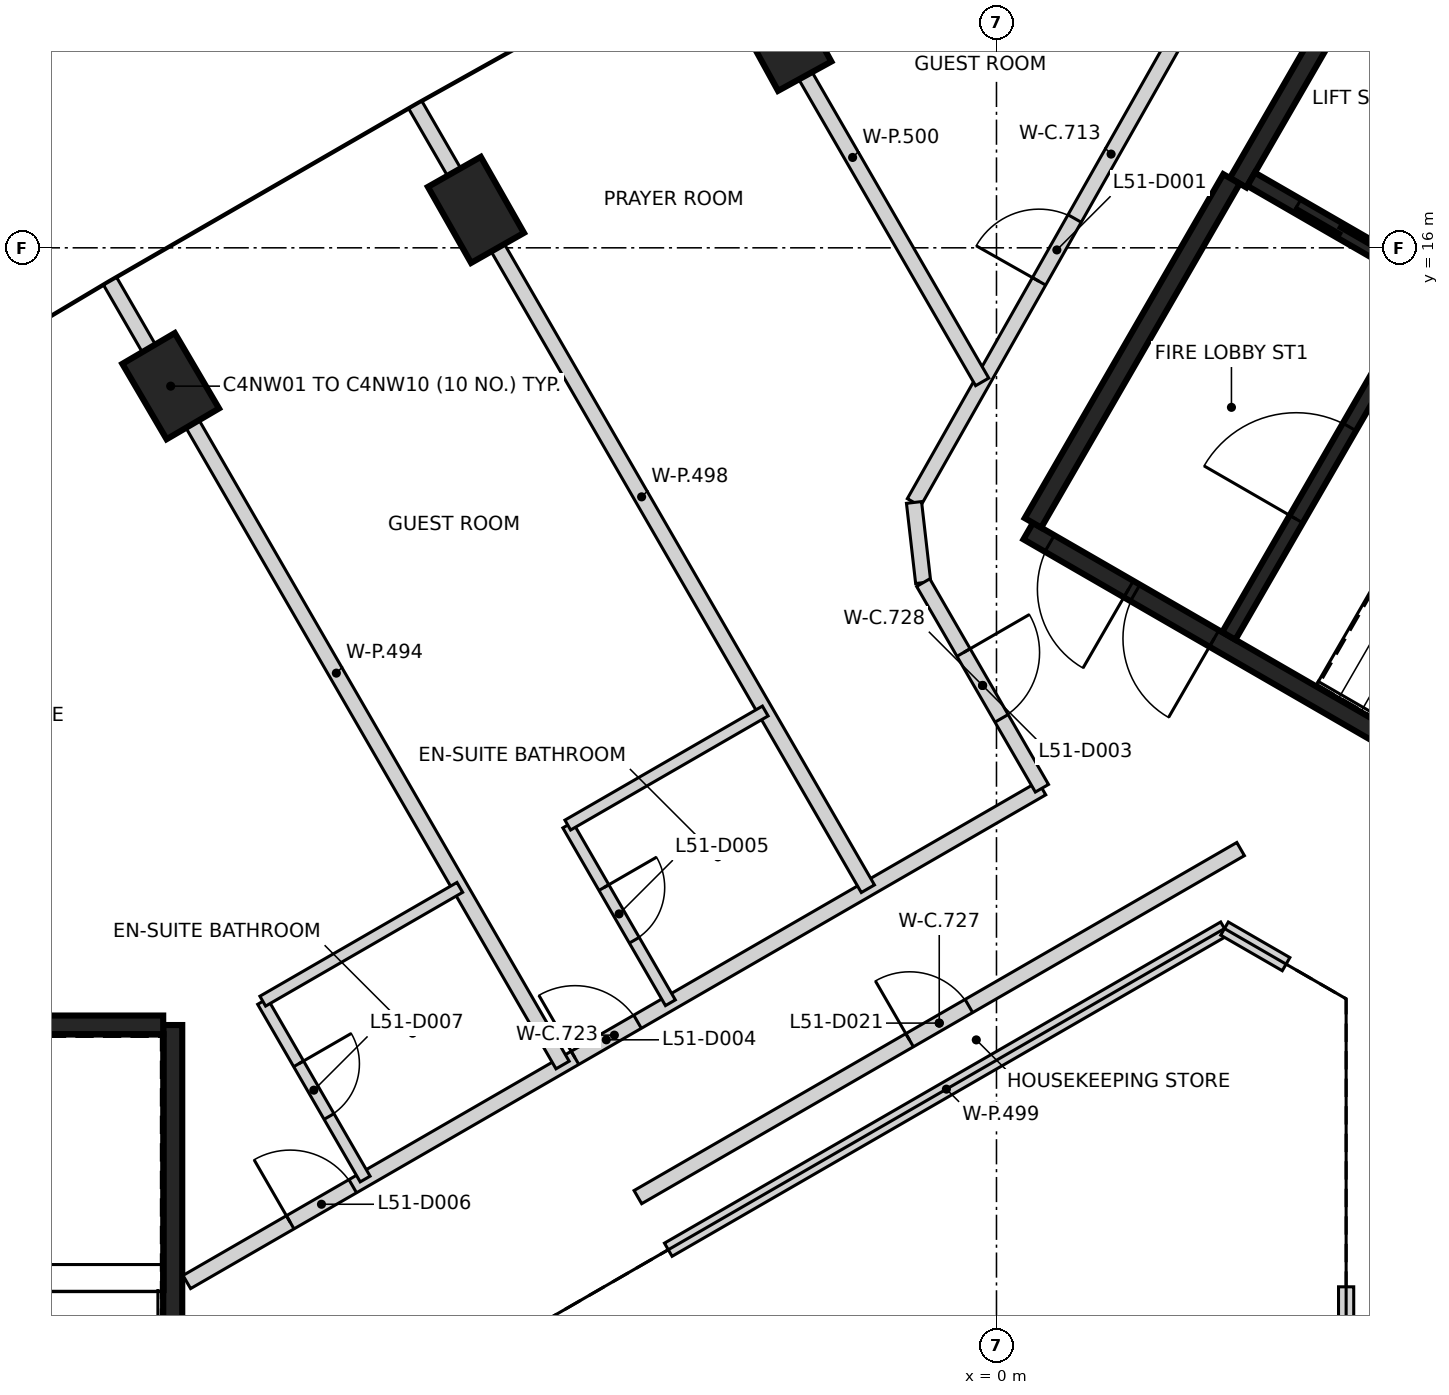
"""IFC4 building model, lengths in metres.
Left out: names, types, materials, properties, quantities, classifications, styles, units other than length and angle.
Written with IfcOpenShell. Run it as: python <this file> out.ifc"""

import sys

from ifc_helpers import new_model, si_unit, direction, frame, frame_2d, origin, origin_2d, place, context, subcontext, project, spatial, rectangle, extrude, element, fill, save


model = new_model("IFC4")
c1 = context("Model", 3, precision=1e-05, world=origin(), true_north=direction((0.0, 1.0)))
c2 = subcontext(c1, "Body", "Model", "MODEL_VIEW")
j1 = project(units=[si_unit("LENGTHUNIT", "METRE"), si_unit("PLANEANGLEUNIT", "RADIAN")], contexts=[c1])
p1 = place(None, origin())
s1 = spatial("IfcSite", under=j1, at=p1, CompositionType="ELEMENT")
p2 = place(p1, origin())
s2 = spatial("IfcBuilding", under=s1, at=p2, CompositionType="ELEMENT")
p3 = place(p2, frame((0.0, 0.0, 204.4)))
s3 = spatial("IfcBuildingStorey", under=s2, at=p3, CompositionType="ELEMENT", Elevation=204.4)
for number, where, z_axis, x_axis in (
    (1, (-2.8, 18.762, -0.35), (0.0, 0.0, 1.0), (-0.482, 0.876, 0.0)),
    (2, (-6.848, 16.499, -0.35), (0.0, 0.0, 1.0), (-0.494, 0.87, 0.0)),
    (3, (-10.864, 14.18, -0.35), (0.0, 0.0, 1.0), (-0.506, 0.862, 0.0)),
):
    element("IfcColumn", number, at=place(p3, frame(where, z_axis=z_axis, x_axis=x_axis)), inside=s3, PredefinedType="COLUMN", context=c2, shape_type="SweptSolid", body=[
        extrude(rectangle(XDim=1.15, YDim=0.8, at=origin_2d()), origin(), (0.0, 0.0, 1.0), 3.6),
    ])
p4 = place(p3, frame((-10.837, 5.775, 0.0), z_axis=(0.0, 0.0, 1.0), x_axis=(0.0, -1.0, 0.0)))
e4 = element("IfcWall", 4, at=p4, inside=s3, PredefinedType="SHEAR", context=c2, shape_type="SweptSolid", body=[
    extrude(rectangle(XDim=11.55, YDim=0.25, at=frame_2d((5.775, 0.0))), origin(), (0.0, 0.0, 1.0), 3.25),
])
p5 = place(p4, frame((10.025, 0.0, 0.0)))
e5 = element("IfcOpeningElement", 5, at=p5, cuts=e4, PredefinedType="OPENING", context=c2, shape_type="SweptSolid", body=[
    extrude(rectangle(XDim=1.2, YDim=2.1, at=frame_2d((0.6, 1.05))), frame((0.0, 0.135, 0.0), z_axis=(0.0, -1.0, 0.0), x_axis=(1.0, 0.0, 0.0)), (0.0, 0.0, 1.0), 0.27),
])
p6 = place(p4, frame((8.725, 0.0, 0.0)))
e6 = element("IfcOpeningElement", 6, at=p6, cuts=e4, PredefinedType="OPENING", context=c2, shape_type="SweptSolid", body=[
    extrude(rectangle(XDim=1.2, YDim=2.1, at=frame_2d((0.6, 1.05))), frame((0.0, 0.135, 0.0), z_axis=(0.0, -1.0, 0.0), x_axis=(1.0, 0.0, 0.0)), (0.0, 0.0, 1.0), 0.27),
])
p7 = place(p3, frame((-16.472, 5.775, 0.0), z_axis=(0.0, 0.0, 1.0), x_axis=(1.0, 0.0, 0.0)))
e7 = element("IfcWall", 7, at=p7, inside=s3, PredefinedType="SHEAR", context=c2, shape_type="SweptSolid", body=[
    extrude(rectangle(XDim=5.51, YDim=0.25, at=frame_2d((2.755, 0.0))), origin(), (0.0, 0.0, 1.0), 3.25),
])
p8 = place(p3, frame((10.42, 6.498, 0.0), z_axis=(0.0, 0.0, 1.0), x_axis=(-0.866021906294, 0.500006057782, 0.0)))
e8 = element("IfcWall", 8, at=p8, inside=s3, PredefinedType="SHEAR", context=c2, shape_type="SweptSolid", body=[
    extrude(rectangle(XDim=11.55, YDim=0.25, at=frame_2d((5.775, 0.0))), origin(), (0.0, 0.0, 1.0), 3.25),
])
p9 = place(p8, frame((10.025, 0.0, 0.0)))
e9 = element("IfcOpeningElement", 9, at=p9, cuts=e8, PredefinedType="OPENING", context=c2, shape_type="SweptSolid", body=[
    extrude(rectangle(XDim=1.2, YDim=2.1, at=frame_2d((0.6, 1.05))), frame((0.0, 0.135, 0.0), z_axis=(0.0, -1.0, 0.0), x_axis=(1.0, 0.0, 0.0)), (0.0, 0.0, 1.0), 0.27),
])
p10 = place(p8, frame((8.725, 0.0, 0.0)))
e10 = element("IfcOpeningElement", 10, at=p10, cuts=e8, PredefinedType="OPENING", context=c2, shape_type="SweptSolid", body=[
    extrude(rectangle(XDim=1.2, YDim=2.1, at=frame_2d((0.6, 1.05))), frame((0.0, 0.135, 0.0), z_axis=(0.0, -1.0, 0.0), x_axis=(1.0, 0.0, 0.0)), (0.0, 0.0, 1.0), 0.27),
])
p11 = place(p3, frame((3.179, 16.856, 0.0), z_axis=(0.0, 0.0, 1.0), x_axis=(0.500001955336, 0.866024274868, 0.0)))
e11 = element("IfcWall", 11, at=p11, inside=s3, PredefinedType="SHEAR", context=c2, shape_type="SweptSolid", body=[
    extrude(rectangle(XDim=6.125, YDim=0.25, at=frame_2d((3.062, 0.0))), origin(), (0.0, 0.0, 1.0), 3.25),
])
p12 = place(p11, frame((3.563, 0.0, 0.0)))
e12 = element("IfcOpeningElement", 12, at=p12, cuts=e11, PredefinedType="OPENING", context=c2, shape_type="SweptSolid", body=[
    extrude(rectangle(XDim=1.0, YDim=2.1, at=frame_2d((0.5, 1.05))), frame((0.0, 0.135, 0.0), z_axis=(0.0, -1.0, 0.0), x_axis=(1.0, 0.0, 0.0)), (0.0, 0.0, 1.0), 0.27),
])
p13 = place(p3, frame((0.48, 12.381, 0.0), z_axis=(0.0, 0.0, 1.0), x_axis=(0.49999885962, 0.866026062182, 0.0)))
e13 = element("IfcWall", 13, at=p13, inside=s3, PredefinedType="SHEAR", context=c2, shape_type="SweptSolid", body=[
    extrude(rectangle(XDim=5.225, YDim=0.25, at=frame_2d((2.612, 0.0))), origin(), (0.0, 0.0, 1.0), 3.25),
])
p14 = place(p3, frame((3.057, 10.895, 0.0), z_axis=(0.0, 0.0, 1.0), x_axis=(0.500027839223, 0.866009330205, 0.0)))
e14 = element("IfcWall", 14, at=p14, inside=s3, PredefinedType="SHEAR", context=c2, shape_type="SweptSolid", body=[
    extrude(rectangle(XDim=5.098, YDim=0.2, at=frame_2d((2.549, 0.0))), origin(), (0.0, 0.0, 1.0), 3.25),
])
p15 = place(p14, frame((1.774, 0.0, 0.0)))
e15 = element("IfcOpeningElement", 15, at=p15, cuts=e14, PredefinedType="OPENING", context=c2, shape_type="SweptSolid", body=[
    extrude(rectangle(XDim=1.4, YDim=2.1, at=frame_2d((0.7, 1.05))), frame((0.0, 0.11, 0.0), z_axis=(0.0, -1.0, 0.0), x_axis=(1.0, 0.0, 0.0)), (0.0, 0.0, 1.0), 0.22),
])
p16 = place(p3, frame((5.646, 15.576, 0.0), z_axis=(0.0, 0.0, 1.0), x_axis=(-0.866018407898, 0.500012117035, 0.0)))
e16 = element("IfcWall", 16, at=p16, inside=s3, PredefinedType="SHEAR", context=c2, shape_type="SweptSolid", body=[
    extrude(rectangle(XDim=2.651, YDim=0.2, at=frame_2d((1.325, 0.0))), origin(), (0.0, 0.0, 1.0), 3.25),
])
p17 = place(p16, frame((0.652, 0.0, 0.0)))
e17 = element("IfcOpeningElement", 17, at=p17, cuts=e16, PredefinedType="OPENING", context=c2, shape_type="SweptSolid", body=[
    extrude(rectangle(XDim=1.3, YDim=2.1, at=frame_2d((0.65, 1.05))), frame((0.0, 0.11, 0.0), z_axis=(0.0, -1.0, 0.0), x_axis=(1.0, 0.0, 0.0)), (0.0, 0.0, 1.0), 0.22),
])
p18 = place(p3, frame((7.196, 18.26, 0.0), z_axis=(0.0, 0.0, 1.0), x_axis=(-0.866018407898, 0.500012117035, 0.0)))
e18 = element("IfcWall", 18, at=p18, inside=s3, PredefinedType="SHEAR", context=c2, shape_type="SweptSolid", body=[
    extrude(rectangle(XDim=2.651, YDim=0.2, at=frame_2d((1.325, 0.0))), origin(), (0.0, 0.0, 1.0), 3.25),
])
p19 = place(p3, frame((-10.652, 2.394, 0.0), z_axis=(0.0, 0.0, 1.0), x_axis=(0.866016271077, 0.500015817979, 0.0)))
e19 = element("IfcWall", 19, at=p19, inside=s3, PredefinedType="PARTITIONING", context=c2, shape_type="SweptSolid", body=[
    extrude(rectangle(XDim=12.991, YDim=0.2, at=frame_2d((6.495, 0.0))), origin(), (0.0, 0.0, 1.0), 3.25),
])
p20 = place(p19, frame((5.898, 0.0, 0.0)))
e20 = element("IfcOpeningElement", 20, at=p20, cuts=e19, PredefinedType="OPENING", context=c2, shape_type="SweptSolid", body=[
    extrude(rectangle(XDim=0.95, YDim=2.1, at=frame_2d((0.475, 1.05))), frame((0.0, 0.11, 0.0), z_axis=(0.0, -1.0, 0.0), x_axis=(1.0, 0.0, 0.0)), (0.0, 0.0, 1.0), 0.22),
])
p21 = place(p19, frame((1.571, 0.0, 0.0)))
e21 = element("IfcOpeningElement", 21, at=p21, cuts=e19, PredefinedType="OPENING", context=c2, shape_type="SweptSolid", body=[
    extrude(rectangle(XDim=0.95, YDim=2.1, at=frame_2d((0.475, 1.05))), frame((0.0, 0.11, 0.0), z_axis=(0.0, -1.0, 0.0), x_axis=(1.0, 0.0, 0.0)), (0.0, 0.0, 1.0), 0.22),
])
p22 = place(p3, frame((-4.718, 3.511, 0.0), z_axis=(0.0, 0.0, 1.0), x_axis=(0.865989775611, 0.500061704731, 0.0)))
e22 = element("IfcWall", 22, at=p22, inside=s3, PredefinedType="PARTITIONING", context=c2, shape_type="SweptSolid", body=[
    extrude(rectangle(XDim=9.157, YDim=0.2, at=frame_2d((4.579, 0.0))), origin(), (0.0, 0.0, 1.0), 3.25),
])
p23 = place(p22, frame((4.128, 0.0, 0.0)))
e23 = element("IfcOpeningElement", 23, at=p23, cuts=e22, PredefinedType="OPENING", context=c2, shape_type="SweptSolid", body=[
    extrude(rectangle(XDim=0.9, YDim=2.1, at=frame_2d((0.45, 1.05))), frame((0.0, 0.11, 0.0), z_axis=(0.0, -1.0, 0.0), x_axis=(1.0, 0.0, 0.0)), (0.0, 0.0, 1.0), 0.22),
])
p24 = place(p3, frame((-1.086, 12.65, 0.0), z_axis=(0.0, 0.0, 1.0), x_axis=(0.492552173528, 0.87028291742, 0.0)))
e24 = element("IfcWall", 24, at=p24, inside=s3, PredefinedType="PARTITIONING", context=c2, shape_type="SweptSolid", body=[
    extrude(rectangle(XDim=10.531, YDim=0.2, at=frame_2d((5.266, 0.0))), origin(), (0.0, 0.0, 1.0), 3.25),
])
p25 = place(p24, frame((3.342, 0.0, 0.0)))
e25 = element("IfcOpeningElement", 25, at=p25, cuts=e24, PredefinedType="OPENING", context=c2, shape_type="SweptSolid", body=[
    extrude(rectangle(XDim=0.95, YDim=2.1, at=frame_2d((0.475, 1.05))), frame((0.0, 0.11, 0.0), z_axis=(0.0, -1.0, 0.0), x_axis=(1.0, 0.0, 0.0)), (0.0, 0.0, 1.0), 0.22),
])
p26 = place(p3, frame((-1.085, 12.65, 0.0), z_axis=(0.0, 0.0, 1.0), x_axis=(0.113812454263, -0.993502252264, 0.0)))
e26 = element("IfcWall", 26, at=p26, inside=s3, PredefinedType="PARTITIONING", context=c2, shape_type="SweptSolid", body=[
    extrude(rectangle(XDim=1.062, YDim=0.2, at=frame_2d((0.531, 0.0))), origin(), (0.0, 0.0, 1.0), 3.25),
])
p27 = place(p3, frame((-0.964, 11.595, 0.0), z_axis=(0.0, 0.0, 1.0), x_axis=(0.500056215256, -0.865992945458, 0.0)))
e27 = element("IfcWall", 27, at=p27, inside=s3, PredefinedType="PARTITIONING", context=c2, shape_type="SweptSolid", body=[
    extrude(rectangle(XDim=3.124, YDim=0.2, at=frame_2d((1.562, 0.0))), origin(), (0.0, 0.0, 1.0), 3.25),
])
p28 = place(p27, frame((1.062, 0.0, 0.0)))
e28 = element("IfcOpeningElement", 28, at=p28, cuts=e27, PredefinedType="OPENING", context=c2, shape_type="SweptSolid", body=[
    extrude(rectangle(XDim=1.0, YDim=2.1, at=frame_2d((0.5, 1.05))), frame((0.0, 0.11, 0.0), z_axis=(0.0, -1.0, 0.0), x_axis=(1.0, 0.0, 0.0)), (0.0, 0.0, 1.0), 0.22),
])
p29 = place(p3, frame((-11.661, 15.561, 0.0), z_axis=(0.0, 0.0, 1.0), x_axis=(0.499960887391, -0.866047984282, 0.0)))
e29 = element("IfcWall", 29, at=p29, inside=s3, PredefinedType="PARTITIONING", context=c2, shape_type="SweptSolid", body=[
    extrude(rectangle(XDim=11.907, YDim=0.2, at=frame_2d((5.953, 0.0))), origin(), (0.0, 0.0, 1.0), 3.25),
])
p30 = place(p3, frame((-7.646, 17.879, 0.0), z_axis=(0.0, 0.0, 1.0), x_axis=(0.500042538917, -0.866000842536, 0.0)))
e30 = element("IfcWall", 30, at=p30, inside=s3, PredefinedType="PARTITIONING", context=c2, shape_type="SweptSolid", body=[
    extrude(rectangle(XDim=11.906, YDim=0.2, at=frame_2d((5.953, 0.0))), origin(), (0.0, 0.0, 1.0), 3.25),
])
p31 = place(p3, frame((-4.318, 2.819, 0.0), z_axis=(0.0, 0.0, 1.0), x_axis=(0.866038843867, 0.499976720371, 0.0)))
e31 = element("IfcWall", 31, at=p31, inside=s3, PredefinedType="PARTITIONING", context=c2, shape_type="SweptSolid", body=[
    extrude(rectangle(XDim=8.45, YDim=0.2, at=frame_2d((4.225, 0.0))), origin(), (0.0, 0.0, 1.0), 3.25),
])
p32 = place(p3, frame((-3.598, 20.142, 0.0), z_axis=(0.0, 0.0, 1.0), x_axis=(0.499981732209, -0.866035950442, 0.0)))
e32 = element("IfcWall", 32, at=p32, inside=s3, PredefinedType="PARTITIONING", context=c2, shape_type="SweptSolid", body=[
    extrude(rectangle(XDim=6.82, YDim=0.2, at=frame_2d((3.41, 0.0))), origin(), (0.0, 0.0, 1.0), 3.25),
])
p33 = place(p3, frame((3.0, 7.044, 0.0), z_axis=(0.0, 0.0, 1.0), x_axis=(0.865872609263, -0.500264554538, 0.0)))
e33 = element("IfcWall", 33, at=p33, inside=s3, PredefinedType="PARTITIONING", context=c2, shape_type="SweptSolid", body=[
    extrude(rectangle(XDim=0.936, YDim=0.2, at=frame_2d((0.468, 0.0))), origin(), (0.0, 0.0, 1.0), 3.25),
])
p34 = place(p3, frame((4.6, -6.12, 0.0), z_axis=(0.0, 0.0, 1.0), x_axis=(0.0, 1.0, 0.0)))
e34 = element("IfcWall", 34, at=p34, inside=s3, PredefinedType="PARTITIONING", context=c2, shape_type="SweptSolid", body=[
    extrude(rectangle(XDim=8.451, YDim=0.2, at=frame_2d((4.226, 0.0))), origin(), (0.0, 0.0, 1.0), 3.25),
])
p35 = place(p3, frame((-9.655, 6.085, 0.0), z_axis=(0.0, 0.0, 1.0), x_axis=(0.500129820725, -0.865950438779, 0.0)))
e35 = element("IfcWall", 35, at=p35, inside=s3, PredefinedType="PARTITIONING", context=c2, shape_type="SweptSolid", body=[
    extrude(rectangle(XDim=2.698, YDim=0.15, at=frame_2d((1.349, 0.0))), origin(), (0.0, 0.0, 1.0), 3.25),
])
p36 = place(p35, frame((0.948, 0.0, 0.0)))
e36 = element("IfcOpeningElement", 36, at=p36, cuts=e35, PredefinedType="OPENING", context=c2, shape_type="SweptSolid", body=[
    extrude(rectangle(XDim=0.8, YDim=2.1, at=frame_2d((0.4, 1.05))), frame((0.0, 0.085, 0.0), z_axis=(0.0, -1.0, 0.0), x_axis=(1.0, 0.0, 0.0)), (0.0, 0.0, 1.0), 0.17),
])
p37 = place(p3, frame((-9.653, 6.089, 0.0), z_axis=(0.0, 0.0, 1.0), x_axis=(0.866021254674, 0.500007186402, 0.0)))
e37 = element("IfcWall", 37, at=p37, inside=s3, PredefinedType="PARTITIONING", context=c2, shape_type="SweptSolid", body=[
    extrude(rectangle(XDim=2.994, YDim=0.15, at=frame_2d((1.497, 0.0))), origin(), (0.0, 0.0, 1.0), 3.25),
])
p38 = place(p3, frame((-5.64, 8.406, 0.0), z_axis=(0.0, 0.0, 1.0), x_axis=(0.50001992892, -0.866013897511, 0.0)))
e38 = element("IfcWall", 38, at=p38, inside=s3, PredefinedType="PARTITIONING", context=c2, shape_type="SweptSolid", body=[
    extrude(rectangle(XDim=2.7, YDim=0.15, at=frame_2d((1.35, 0.0))), origin(), (0.0, 0.0, 1.0), 3.25),
])
p39 = place(p38, frame((0.95, 0.0, 0.0)))
e39 = element("IfcOpeningElement", 39, at=p39, cuts=e38, PredefinedType="OPENING", context=c2, shape_type="SweptSolid", body=[
    extrude(rectangle(XDim=0.8, YDim=2.1, at=frame_2d((0.4, 1.05))), frame((0.0, 0.085, 0.0), z_axis=(0.0, -1.0, 0.0), x_axis=(1.0, 0.0, 0.0)), (0.0, 0.0, 1.0), 0.17),
])
p40 = place(p3, frame((-5.64, 8.406, 0.0), z_axis=(0.0, 0.0, 1.0), x_axis=(0.866010750942, 0.50002537861, 0.0)))
e40 = element("IfcWall", 40, at=p40, inside=s3, PredefinedType="PARTITIONING", context=c2, shape_type="SweptSolid", body=[
    extrude(rectangle(XDim=3.0, YDim=0.15, at=frame_2d((1.5, 0.0))), origin(), (0.0, 0.0, 1.0), 3.25),
])
p41 = place(p17, origin())
e41 = element("IfcDoor", 41, at=p41, inside=s3, OperationType="SLIDING_TO_LEFT", PredefinedType="DOOR", context=c2, shape_type="SweptSolid", body=[
    extrude(rectangle(XDim=1.3, YDim=2.1, at=frame_2d((0.65, 1.05))), frame((0.0, 0.025, 0.0), z_axis=(0.0, -1.0, 0.0), x_axis=(1.0, 0.0, 0.0)), (0.0, 0.0, 1.0), 0.05),
])
fill(e17, e41)
p42 = place(p9, origin())
e42 = element("IfcDoor", 42, at=p42, inside=s3, OperationType="SINGLE_SWING_LEFT", PredefinedType="DOOR", context=c2, shape_type="SweptSolid", body=[
    extrude(rectangle(XDim=1.2, YDim=2.1, at=frame_2d((0.6, 1.05))), frame((0.0, 0.025, 0.0), z_axis=(0.0, -1.0, 0.0), x_axis=(1.0, 0.0, 0.0)), (0.0, 0.0, 1.0), 0.05),
])
fill(e9, e42)
p43 = place(p10, origin())
e43 = element("IfcDoor", 43, at=p43, inside=s3, OperationType="SINGLE_SWING_RIGHT", PredefinedType="DOOR", context=c2, shape_type="SweptSolid", body=[
    extrude(rectangle(XDim=1.2, YDim=2.1, at=frame_2d((0.6, 1.05))), frame((0.0, 0.025, 0.0), z_axis=(0.0, -1.0, 0.0), x_axis=(1.0, 0.0, 0.0)), (0.0, 0.0, 1.0), 0.05),
])
fill(e10, e43)
p44 = place(p15, origin())
e44 = element("IfcDoor", 44, at=p44, inside=s3, OperationType="SINGLE_SWING_LEFT", PredefinedType="DOOR", context=c2, shape_type="SweptSolid", body=[
    extrude(rectangle(XDim=1.4, YDim=2.1, at=frame_2d((0.7, 1.05))), frame((0.0, 0.025, 0.0), z_axis=(0.0, -1.0, 0.0), x_axis=(1.0, 0.0, 0.0)), (0.0, 0.0, 1.0), 0.05),
])
fill(e15, e44)
p45 = place(p25, origin())
e45 = element("IfcDoor", 45, at=p45, inside=s3, OperationType="SINGLE_SWING_LEFT", PredefinedType="DOOR", context=c2, shape_type="SweptSolid", body=[
    extrude(rectangle(XDim=0.95, YDim=2.1, at=frame_2d((0.475, 1.05))), frame((0.0, 0.025, 0.0), z_axis=(0.0, -1.0, 0.0), x_axis=(1.0, 0.0, 0.0)), (0.0, 0.0, 1.0), 0.05),
])
fill(e25, e45)
p46 = place(p28, frame((1.0, 0.0, 0.0), z_axis=(0.0, 0.0, 1.0), x_axis=(-1.0, 0.0, 0.0)))
e46 = element("IfcDoor", 46, at=p46, inside=s3, OperationType="SINGLE_SWING_LEFT", PredefinedType="DOOR", context=c2, shape_type="SweptSolid", body=[
    extrude(rectangle(XDim=1.0, YDim=2.1, at=frame_2d((0.5, 1.05))), frame((0.0, 0.025, 0.0), z_axis=(0.0, -1.0, 0.0), x_axis=(1.0, 0.0, 0.0)), (0.0, 0.0, 1.0), 0.05),
])
fill(e28, e46)
p47 = place(p20, origin())
e47 = element("IfcDoor", 47, at=p47, inside=s3, OperationType="SINGLE_SWING_LEFT", PredefinedType="DOOR", context=c2, shape_type="SweptSolid", body=[
    extrude(rectangle(XDim=0.95, YDim=2.1, at=frame_2d((0.475, 1.05))), frame((0.0, 0.025, 0.0), z_axis=(0.0, -1.0, 0.0), x_axis=(1.0, 0.0, 0.0)), (0.0, 0.0, 1.0), 0.05),
])
fill(e20, e47)
p48 = place(p39, origin())
e48 = element("IfcDoor", 48, at=p48, inside=s3, OperationType="SINGLE_SWING_LEFT", PredefinedType="DOOR", context=c2, shape_type="SweptSolid", body=[
    extrude(rectangle(XDim=0.8, YDim=2.1, at=frame_2d((0.4, 1.05))), frame((0.0, 0.025, 0.0), z_axis=(0.0, -1.0, 0.0), x_axis=(1.0, 0.0, 0.0)), (0.0, 0.0, 1.0), 0.05),
])
fill(e39, e48)
p49 = place(p21, origin())
e49 = element("IfcDoor", 49, at=p49, inside=s3, OperationType="SINGLE_SWING_LEFT", PredefinedType="DOOR", context=c2, shape_type="SweptSolid", body=[
    extrude(rectangle(XDim=0.95, YDim=2.1, at=frame_2d((0.475, 1.05))), frame((0.0, 0.025, 0.0), z_axis=(0.0, -1.0, 0.0), x_axis=(1.0, 0.0, 0.0)), (0.0, 0.0, 1.0), 0.05),
])
fill(e21, e49)
p50 = place(p36, frame((0.8, 0.0, 0.0), z_axis=(0.0, 0.0, 1.0), x_axis=(-1.0, 0.0, 0.0)))
e50 = element("IfcDoor", 50, at=p50, inside=s3, OperationType="SINGLE_SWING_LEFT", PredefinedType="DOOR", context=c2, shape_type="SweptSolid", body=[
    extrude(rectangle(XDim=0.8, YDim=2.1, at=frame_2d((0.4, 1.05))), frame((0.0, 0.025, 0.0), z_axis=(0.0, -1.0, 0.0), x_axis=(1.0, 0.0, 0.0)), (0.0, 0.0, 1.0), 0.05),
])
fill(e36, e50)
p51 = place(p23, frame((0.9, 0.0, 0.0), z_axis=(0.0, 0.0, 1.0), x_axis=(-1.0, 0.0, 0.0)))
e51 = element("IfcDoor", 51, at=p51, inside=s3, OperationType="SINGLE_SWING_LEFT", PredefinedType="DOOR", context=c2, shape_type="SweptSolid", body=[
    extrude(rectangle(XDim=0.9, YDim=2.1, at=frame_2d((0.45, 1.05))), frame((0.0, 0.025, 0.0), z_axis=(0.0, -1.0, 0.0), x_axis=(1.0, 0.0, 0.0)), (0.0, 0.0, 1.0), 0.05),
])
fill(e23, e51)
save(model, sys.argv[1])
